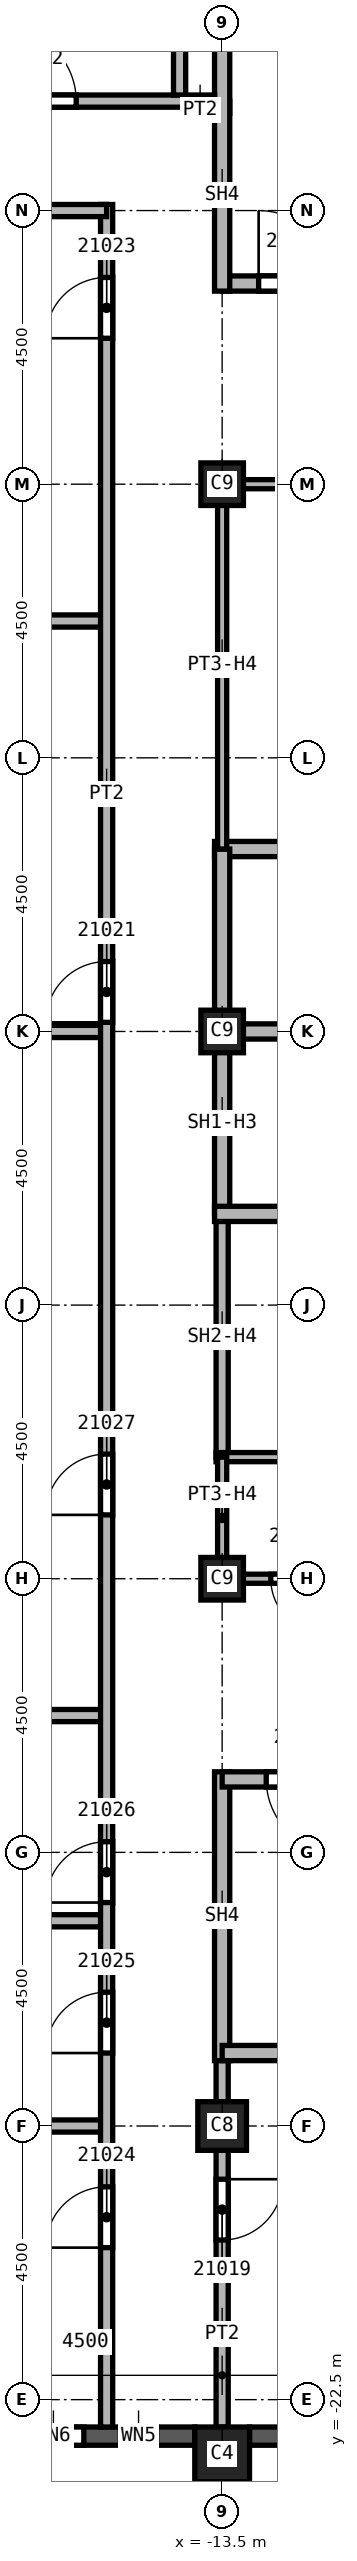
"""IFC4 building model, lengths in metres.
Left out: names, types, materials, properties, quantities, classifications, styles, units other than length and angle.
Written with IfcOpenShell. Run it as: python <this file> out.ifc"""

import sys

from ifc_helpers import new_model, si_unit, direction, frame, frame_2d, origin, origin_2d, place, context, subcontext, project, spatial, rectangle, extrude, element, fill, save


model = new_model("IFC4")
c1 = context("Model", 3, precision=1e-05, world=origin(), true_north=direction((0.0, 1.0)))
c2 = subcontext(c1, "Body", "Model", "MODEL_VIEW")
j1 = project(units=[si_unit("LENGTHUNIT", "METRE"), si_unit("PLANEANGLEUNIT", "RADIAN")], contexts=[c1])
p1 = place(None, origin())
s1 = spatial("IfcSite", under=j1, at=p1, CompositionType="ELEMENT")
p2 = place(p1, origin())
s2 = spatial("IfcBuilding", under=s1, at=p2, CompositionType="ELEMENT")
p3 = place(p2, frame((0.0, 0.0, 308.0)))
s3 = spatial("IfcBuildingStorey", under=s2, at=p3, CompositionType="ELEMENT", Elevation=308.0)
p4 = place(p3, frame((-13.5, -18.0, 0.0), z_axis=(0.0, 0.0, 1.0), x_axis=(1.0, 0.0, 0.0)))
e1 = element("IfcColumn", 1, at=p4, inside=s3, PredefinedType="COLUMN", context=c2, shape_type="SweptSolid", body=[
    extrude(rectangle(XDim=0.8, YDim=0.8, at=origin_2d()), origin(), (0.0, 0.0, 1.0), 3.74),
])
for number, where, z_axis, x_axis in (
    (2, (-13.5, 0.0, 0.0), (0.0, 0.0, 1.0), (1.0, 0.0, 0.0)),
    (3, (-13.5, 9.0, 0.0), (0.0, 0.0, 1.0), (1.0, 0.0, 0.0)),
    (4, (-13.5, -9.0, 0.0), (0.0, 0.0, 1.0), (1.0, 0.0, 0.0)),
):
    element("IfcColumn", number, at=place(p3, frame(where, z_axis=z_axis, x_axis=x_axis)), inside=s3, PredefinedType="COLUMN", context=c2, shape_type="SweptSolid", body=[
        extrude(rectangle(XDim=0.7, YDim=0.7, at=origin_2d()), origin(), (0.0, 0.0, 1.0), 3.74),
    ])
p5 = place(p3, frame((-13.5, -23.4, 0.0), z_axis=(0.0, 0.0, 1.0), x_axis=(1.0, 0.0, 0.0)))
e5 = element("IfcColumn", 5, at=p5, inside=s3, PredefinedType="COLUMN", context=c2, shape_type="SweptSolid", body=[
    extrude(rectangle(XDim=0.9, YDim=0.9, at=origin_2d()), origin(), (0.0, 0.0, 1.0), 3.74),
])
p6 = place(p3, frame((-17.55, -23.1, 0.0), z_axis=(0.0, 0.0, 1.0), x_axis=(1.0, 0.0, 0.0)))
e6 = element("IfcWall", 6, at=p6, inside=s3, PredefinedType="SOLIDWALL", context=c2, shape_type="SweptSolid", body=[
    extrude(rectangle(XDim=3.6, YDim=0.3, at=frame_2d((1.8, 0.0))), origin(), (0.0, 0.0, 1.0), 3.14),
])
p7 = place(p6, frame((0.775, 0.0, 0.8)))
e7 = element("IfcOpeningElement", 7, at=p7, cuts=e6, PredefinedType="OPENING", context=c2, shape_type="SweptSolid", body=[
    extrude(rectangle(XDim=1.0, YDim=1.95, at=frame_2d((0.5, 0.975))), frame((0.0, 0.15, 0.0), z_axis=(0.0, -1.0, 0.0), x_axis=(1.0, 0.0, 0.0)), (0.0, 0.0, 1.0), 0.3),
])
p8 = place(p6, frame((2.375, 0.0, 0.8)))
e8 = element("IfcOpeningElement", 8, at=p8, cuts=e6, PredefinedType="OPENING", context=c2, shape_type="SweptSolid", body=[
    extrude(rectangle(XDim=0.6, YDim=1.95, at=frame_2d((0.3, 0.975))), frame((0.0, 0.15, 0.0), z_axis=(0.0, -1.0, 0.0), x_axis=(1.0, 0.0, 0.0)), (0.0, 0.0, 1.0), 0.3),
])
p9 = place(p3, frame((-13.05, -23.1, 0.0), z_axis=(0.0, 0.0, 1.0), x_axis=(1.0, 0.0, 0.0)))
e9 = element("IfcWall", 9, at=p9, inside=s3, PredefinedType="SOLIDWALL", context=c2, shape_type="SweptSolid", body=[
    extrude(rectangle(XDim=3.6, YDim=0.3, at=frame_2d((1.8, 0.0))), origin(), (0.0, 0.0, 1.0), 3.14),
])
p10 = place(p9, frame((0.6, 0.0, 0.8)))
e10 = element("IfcOpeningElement", 10, at=p10, cuts=e9, PredefinedType="OPENING", context=c2, shape_type="SweptSolid", body=[
    extrude(rectangle(XDim=2.4, YDim=1.95, at=frame_2d((1.2, 0.975))), frame((0.0, 0.15, 0.0), z_axis=(0.0, -1.0, 0.0), x_axis=(1.0, 0.0, 0.0)), (0.0, 0.0, 1.0), 0.3),
])
for number, where, z_axis, x_axis in (
    (11, (-26.55, -14.625, 0.0), (0.0, 0.0, 1.0), (1.0, 0.0, 0.0)),
    (12, (-26.55, -11.25, 0.0), (0.0, 0.0, 1.0), (1.0, 0.0, 0.0)),
    (13, (-26.55, 6.75, 0.0), (0.0, 0.0, 1.0), (1.0, 0.0, 0.0)),
):
    element("IfcWall", number, at=place(p3, frame(where, z_axis=z_axis, x_axis=x_axis)), inside=s3, PredefinedType="PARTITIONING", context=c2, shape_type="SweptSolid", body=[
        extrude(rectangle(XDim=11.15, YDim=0.2, at=frame_2d((5.575, 0.0))), origin(), (0.0, 0.0, 1.0), 3.74),
    ])
p11 = place(p3, frame((-24.3, -18.0, 0.0), z_axis=(0.0, 0.0, 1.0), x_axis=(1.0, 0.0, 0.0)))
e14 = element("IfcWall", 14, at=p11, inside=s3, PredefinedType="PARTITIONING", context=c2, shape_type="SweptSolid", body=[
    extrude(rectangle(XDim=8.9, YDim=0.2, at=frame_2d((4.45, 0.0))), origin(), (0.0, 0.0, 1.0), 3.74),
])
p12 = place(p3, frame((-15.4, 0.0, 0.0), z_axis=(0.0, 0.0, 1.0), x_axis=(-1.0, 0.0, 0.0)))
e15 = element("IfcWall", 15, at=p12, inside=s3, PredefinedType="PARTITIONING", context=c2, shape_type="SweptSolid", body=[
    extrude(rectangle(XDim=11.15, YDim=0.2, at=frame_2d((5.575, 0.0))), origin(), (0.0, 0.0, 1.0), 3.74),
])
p13 = place(p3, frame((-15.4, -22.95, 0.0), z_axis=(0.0, 0.0, 1.0), x_axis=(0.0, 1.0, 0.0)))
e16 = element("IfcWall", 16, at=p13, inside=s3, PredefinedType="PARTITIONING", context=c2, shape_type="SweptSolid", body=[
    extrude(rectangle(XDim=36.55, YDim=0.2, at=frame_2d((18.275, 0.0))), origin(), (0.0, 0.0, 1.0), 3.74),
])
p14 = place(p13, frame((23.1, 0.0, 0.0)))
e17 = element("IfcOpeningElement", 17, at=p14, cuts=e16, PredefinedType="OPENING", context=c2, shape_type="SweptSolid", body=[
    extrude(rectangle(XDim=1.0, YDim=2.1, at=frame_2d((0.5, 1.05))), frame((0.0, 0.1, 0.0), z_axis=(0.0, -1.0, 0.0), x_axis=(1.0, 0.0, 0.0)), (0.0, 0.0, 1.0), 0.2),
])
p15 = place(p13, frame((34.35, 0.0, 0.0)))
e18 = element("IfcOpeningElement", 18, at=p15, cuts=e16, PredefinedType="OPENING", context=c2, shape_type="SweptSolid", body=[
    extrude(rectangle(XDim=1.0, YDim=2.1, at=frame_2d((0.5, 1.05))), frame((0.0, 0.1, 0.0), z_axis=(0.0, -1.0, 0.0), x_axis=(1.0, 0.0, 0.0)), (0.0, 0.0, 1.0), 0.2),
])
p16 = place(p13, frame((2.95, 0.0, 0.0)))
e19 = element("IfcOpeningElement", 19, at=p16, cuts=e16, PredefinedType="OPENING", context=c2, shape_type="SweptSolid", body=[
    extrude(rectangle(XDim=1.0, YDim=2.1, at=frame_2d((0.5, 1.05))), frame((0.0, 0.1, 0.0), z_axis=(0.0, -1.0, 0.0), x_axis=(1.0, 0.0, 0.0)), (0.0, 0.0, 1.0), 0.2),
])
p17 = place(p13, frame((6.15, 0.0, 0.0)))
e20 = element("IfcOpeningElement", 20, at=p17, cuts=e16, PredefinedType="OPENING", context=c2, shape_type="SweptSolid", body=[
    extrude(rectangle(XDim=1.0, YDim=2.1, at=frame_2d((0.5, 1.05))), frame((0.0, 0.1, 0.0), z_axis=(0.0, -1.0, 0.0), x_axis=(1.0, 0.0, 0.0)), (0.0, 0.0, 1.0), 0.2),
])
p18 = place(p13, frame((8.625, 0.0, 0.0)))
e21 = element("IfcOpeningElement", 21, at=p18, cuts=e16, PredefinedType="OPENING", context=c2, shape_type="SweptSolid", body=[
    extrude(rectangle(XDim=1.0, YDim=2.1, at=frame_2d((0.5, 1.05))), frame((0.0, 0.1, 0.0), z_axis=(0.0, -1.0, 0.0), x_axis=(1.0, 0.0, 0.0)), (0.0, 0.0, 1.0), 0.2),
])
p19 = place(p13, frame((15.0, 0.0, 0.0)))
e22 = element("IfcOpeningElement", 22, at=p19, cuts=e16, PredefinedType="OPENING", context=c2, shape_type="SweptSolid", body=[
    extrude(rectangle(XDim=1.0, YDim=2.1, at=frame_2d((0.5, 1.05))), frame((0.0, 0.1, 0.0), z_axis=(0.0, -1.0, 0.0), x_axis=(1.0, 0.0, 0.0)), (0.0, 0.0, 1.0), 0.2),
])
p20 = place(p3, frame((-15.4, 13.5, 0.0), z_axis=(0.0, 0.0, 1.0), x_axis=(-1.0, 0.0, 0.0)))
e23 = element("IfcWall", 23, at=p20, inside=s3, PredefinedType="PARTITIONING", context=c2, shape_type="SweptSolid", body=[
    extrude(rectangle(XDim=6.6, YDim=0.2, at=frame_2d((3.3, 0.0))), origin(), (0.0, 0.0, 1.0), 3.74),
])
p21 = place(p3, frame((-14.1, 15.2, 0.0), z_axis=(0.0, 0.0, 1.0), x_axis=(1.0, 0.0, 0.0)))
e24 = element("IfcWall", 24, at=p21, inside=s3, PredefinedType="PARTITIONING", context=c2, shape_type="SweptSolid", body=[
    extrude(rectangle(XDim=0.725, YDim=0.2, at=frame_2d((0.363, 0.0))), origin(), (0.0, 0.0, 1.0), 3.74),
])
p22 = place(p3, frame((-13.5, -16.675, 0.0), z_axis=(0.0, 0.0, 1.0), x_axis=(0.0, -1.0, 0.0)))
e25 = element("IfcWall", 25, at=p22, inside=s3, PredefinedType="PARTITIONING", context=c2, shape_type="SweptSolid", body=[
    extrude(rectangle(XDim=6.275, YDim=0.2, at=frame_2d((3.137, 0.0))), origin(), (0.0, 0.0, 1.0), 3.74),
])
p23 = place(p22, frame((2.2, 0.0, 0.0)))
e26 = element("IfcOpeningElement", 26, at=p23, cuts=e25, PredefinedType="OPENING", context=c2, shape_type="SweptSolid", body=[
    extrude(rectangle(XDim=1.0, YDim=2.1, at=frame_2d((0.5, 1.05))), frame((0.0, 0.1, 0.0), z_axis=(0.0, -1.0, 0.0), x_axis=(1.0, 0.0, 0.0)), (0.0, 0.0, 1.0), 0.2),
])
p24 = place(p3, frame((-13.5, -7.0, 0.0), z_axis=(0.0, 0.0, 1.0), x_axis=(0.0, 1.0, 0.0)))
e27 = element("IfcWall", 27, at=p24, inside=s3, PredefinedType="SOLIDWALL", context=c2, shape_type="SweptSolid", body=[
    extrude(rectangle(XDim=4.0, YDim=0.2, at=frame_2d((2.0, 0.0))), origin(), (0.0, 0.0, 1.0), 3.062),
])
p25 = place(p3, frame((-13.625, 0.0, 0.0), z_axis=(0.0, 0.0, 1.0), x_axis=(1.0, 0.0, 0.0)))
e28 = element("IfcWall", 28, at=p25, inside=s3, PredefinedType="SOLIDWALL", context=c2, shape_type="SweptSolid", body=[
    extrude(rectangle(XDim=3.125, YDim=0.25, at=frame_2d((1.562, 0.0))), origin(), (0.0, 0.0, 1.0), 3.74),
])
p26 = place(p3, frame((-13.625, 3.0, 0.0), z_axis=(0.0, 0.0, 1.0), x_axis=(1.0, 0.0, 0.0)))
e29 = element("IfcWall", 29, at=p26, inside=s3, PredefinedType="SOLIDWALL", context=c2, shape_type="SweptSolid", body=[
    extrude(rectangle(XDim=6.125, YDim=0.25, at=frame_2d((3.062, 0.0))), origin(), (0.0, 0.0, 1.0), 3.74),
])
p27 = place(p26, frame((4.0, 0.0, 0.0)))
e30 = element("IfcOpeningElement", 30, at=p27, cuts=e29, PredefinedType="OPENING", context=c2, shape_type="SweptSolid", body=[
    extrude(rectangle(XDim=1.1, YDim=2.1, at=frame_2d((0.55, 1.05))), frame((0.0, 0.125, 0.0), z_axis=(0.0, -1.0, 0.0), x_axis=(1.0, 0.0, 0.0)), (0.0, 0.0, 1.0), 0.25),
])
p28 = place(p3, frame((-13.5, -3.0, 0.0), z_axis=(0.0, 0.0, 1.0), x_axis=(0.0, 1.0, 0.0)))
e31 = element("IfcWall", 31, at=p28, inside=s3, PredefinedType="SOLIDWALL", context=c2, shape_type="SweptSolid", body=[
    extrude(rectangle(XDim=6.0, YDim=0.25, at=frame_2d((3.0, 0.0))), origin(), (0.0, 0.0, 1.0), 3.062),
])
p29 = place(p3, frame((-13.625, -3.0, 0.0), z_axis=(0.0, 0.0, 1.0), x_axis=(1.0, 0.0, 0.0)))
e32 = element("IfcWall", 32, at=p29, inside=s3, PredefinedType="SOLIDWALL", context=c2, shape_type="SweptSolid", body=[
    extrude(rectangle(XDim=6.125, YDim=0.25, at=frame_2d((3.062, 0.0))), origin(), (0.0, 0.0, 1.0), 3.74),
])
p30 = place(p29, frame((4.0, 0.0, 0.0)))
e33 = element("IfcOpeningElement", 33, at=p30, cuts=e32, PredefinedType="OPENING", context=c2, shape_type="SweptSolid", body=[
    extrude(rectangle(XDim=1.1, YDim=2.1, at=frame_2d((0.55, 1.05))), frame((0.0, 0.125, 0.0), z_axis=(0.0, -1.0, 0.0), x_axis=(1.0, 0.0, 0.0)), (0.0, 0.0, 1.0), 0.25),
])
p31 = place(p3, frame((-13.5, -12.175, 0.0), z_axis=(0.0, 0.0, 1.0), x_axis=(0.0, -1.0, 0.0)))
e34 = element("IfcWall", 34, at=p31, inside=s3, PredefinedType="SOLIDWALL", context=c2, shape_type="SweptSolid", body=[
    extrude(rectangle(XDim=4.75, YDim=0.25, at=frame_2d((2.375, 0.0))), origin(), (0.0, 0.0, 1.0), 3.74),
])
p32 = place(p3, frame((-13.5, 12.3, 0.0), z_axis=(0.0, 0.0, 1.0), x_axis=(1.0, 0.0, 0.0)))
e35 = element("IfcWall", 35, at=p32, inside=s3, PredefinedType="SOLIDWALL", context=c2, shape_type="SweptSolid", body=[
    extrude(rectangle(XDim=9.125, YDim=0.25, at=frame_2d((4.562, 0.0))), origin(), (0.0, 0.0, 1.0), 3.74),
])
p33 = place(p32, frame((0.6, 0.0, 0.0)))
e36 = element("IfcOpeningElement", 36, at=p33, cuts=e35, PredefinedType="OPENING", context=c2, shape_type="SweptSolid", body=[
    extrude(rectangle(XDim=1.2, YDim=2.1, at=frame_2d((0.6, 1.05))), frame((0.0, 0.125, 0.0), z_axis=(0.0, -1.0, 0.0), x_axis=(1.0, 0.0, 0.0)), (0.0, 0.0, 1.0), 0.25),
])
p34 = place(p3, frame((-13.5, 12.175, 0.0), z_axis=(0.0, 0.0, 1.0), x_axis=(0.0, 1.0, 0.0)))
e37 = element("IfcWall", 37, at=p34, inside=s3, PredefinedType="SOLIDWALL", context=c2, shape_type="SweptSolid", body=[
    extrude(rectangle(XDim=4.75, YDim=0.25, at=frame_2d((2.375, 0.0))), origin(), (0.0, 0.0, 1.0), 3.74),
])
p35 = place(p3, frame((-4.5, -16.8, 0.0), z_axis=(0.0, 0.0, 1.0), x_axis=(-1.0, 0.0, 0.0)))
e38 = element("IfcWall", 38, at=p35, inside=s3, PredefinedType="SOLIDWALL", context=c2, shape_type="SweptSolid", body=[
    extrude(rectangle(XDim=9.0, YDim=0.25, at=frame_2d((4.5, 0.0))), origin(), (0.0, 0.0, 1.0), 3.74),
])
p36 = place(p3, frame((-4.375, -12.3, 0.0), z_axis=(0.0, 0.0, 1.0), x_axis=(-1.0, 0.0, 0.0)))
e39 = element("IfcWall", 39, at=p36, inside=s3, PredefinedType="SOLIDWALL", context=c2, shape_type="SweptSolid", body=[
    extrude(rectangle(XDim=9.125, YDim=0.25, at=frame_2d((4.562, 0.0))), origin(), (0.0, 0.0, 1.0), 3.74),
])
p37 = place(p36, frame((7.2, 0.0, 0.0)))
e40 = element("IfcOpeningElement", 40, at=p37, cuts=e39, PredefinedType="OPENING", context=c2, shape_type="SweptSolid", body=[
    extrude(rectangle(XDim=1.2, YDim=2.1, at=frame_2d((0.6, 1.05))), frame((0.0, 0.125, 0.0), z_axis=(0.0, -1.0, 0.0), x_axis=(1.0, 0.0, 0.0)), (0.0, 0.0, 1.0), 0.25),
])
p38 = place(p3, frame((-13.6, -7.0, 0.0), z_axis=(0.0, 0.0, 1.0), x_axis=(1.0, 0.0, 0.0)))
e41 = element("IfcWall", 41, at=p38, inside=s3, PredefinedType="PARTITIONING", context=c2, shape_type="SweptSolid", body=[
    extrude(rectangle(XDim=3.1, YDim=0.15, at=frame_2d((1.55, 0.0))), origin(), (0.0, 0.0, 1.0), 3.74),
])
p39 = place(p3, frame((-13.5, -9.075, 0.0), z_axis=(0.0, 0.0, 1.0), x_axis=(0.0, 1.0, 0.0)))
e42 = element("IfcWall", 42, at=p39, inside=s3, PredefinedType="PARTITIONING", context=c2, shape_type="SweptSolid", body=[
    extrude(rectangle(XDim=2.075, YDim=0.15, at=frame_2d((1.038, 0.0))), origin(), (0.0, 0.0, 1.0), 3.062),
])
p40 = place(p3, frame((-13.5, 3.0, 0.0), z_axis=(0.0, 0.0, 1.0), x_axis=(0.0, 1.0, 0.0)))
e43 = element("IfcWall", 43, at=p40, inside=s3, PredefinedType="PARTITIONING", context=c2, shape_type="SweptSolid", body=[
    extrude(rectangle(XDim=6.075, YDim=0.15, at=frame_2d((3.038, 0.0))), origin(), (0.0, 0.0, 1.0), 3.062),
])
p41 = place(p3, frame((-13.5, 9.0, 0.0), z_axis=(0.0, 0.0, 1.0), x_axis=(1.0, 0.0, 0.0)))
e44 = element("IfcWall", 44, at=p41, inside=s3, PredefinedType="PARTITIONING", context=c2, shape_type="SweptSolid", body=[
    extrude(rectangle(XDim=3.0, YDim=0.15, at=frame_2d((1.5, 0.0))), origin(), (0.0, 0.0, 1.0), 3.062),
])
p42 = place(p3, frame((-10.5, -9.0, 0.0), z_axis=(0.0, 0.0, 1.0), x_axis=(-1.0, 0.0, 0.0)))
e45 = element("IfcWall", 45, at=p42, inside=s3, PredefinedType="PARTITIONING", context=c2, shape_type="SweptSolid", body=[
    extrude(rectangle(XDim=3.0, YDim=0.15, at=frame_2d((1.5, 0.0))), origin(), (0.0, 0.0, 1.0), 3.062),
])
p43 = place(p42, frame((1.3, 0.0, 0.0)))
e46 = element("IfcOpeningElement", 46, at=p43, cuts=e45, PredefinedType="OPENING", context=c2, shape_type="SweptSolid", body=[
    extrude(rectangle(XDim=0.9, YDim=2.1, at=frame_2d((0.45, 1.05))), frame((0.0, 0.075, 0.0), z_axis=(0.0, -1.0, 0.0), x_axis=(1.0, 0.0, 0.0)), (0.0, 0.0, 1.0), 0.15),
])
p44 = place(p3, frame((-21.9, 15.3, 0.0), z_axis=(0.0, 0.0, 1.0), x_axis=(1.0, 0.0, 0.0)))
e47 = element("IfcWall", 47, at=p44, inside=s3, PredefinedType="SOLIDWALL", context=c2, shape_type="SweptSolid", body=[
    extrude(rectangle(XDim=8.275, YDim=0.2, at=frame_2d((4.137, 0.0))), origin(), (0.0, 0.0, 1.0), 3.74),
])
p45 = place(p44, frame((4.8, 0.0, 0.0)))
e48 = element("IfcOpeningElement", 48, at=p45, cuts=e47, PredefinedType="OPENING", context=c2, shape_type="SweptSolid", body=[
    extrude(rectangle(XDim=1.2, YDim=2.1, at=frame_2d((0.6, 1.05))), frame((0.0, 0.1, 0.0), z_axis=(0.0, -1.0, 0.0), x_axis=(1.0, 0.0, 0.0)), (0.0, 0.0, 1.0), 0.2),
])
p46 = place(p3, frame((-14.2, 15.4, 0.0), z_axis=(0.0, 0.0, 1.0), x_axis=(0.0, 1.0, 0.0)))
e49 = element("IfcWall", 49, at=p46, inside=s3, PredefinedType="SOLIDWALL", context=c2, shape_type="SweptSolid", body=[
    extrude(rectangle(XDim=5.9, YDim=0.2, at=frame_2d((2.95, 0.0))), origin(), (0.0, 0.0, 1.0), 3.74),
])
p47 = place(p43, origin())
e50 = element("IfcDoor", 50, at=p47, inside=s3, OperationType="SINGLE_SWING_RIGHT", PredefinedType="DOOR", context=c2, shape_type="SweptSolid", body=[
    extrude(rectangle(XDim=0.9, YDim=2.1, at=frame_2d((0.45, 1.05))), frame((0.0, 0.025, 0.0), z_axis=(0.0, -1.0, 0.0), x_axis=(1.0, 0.0, 0.0)), (0.0, 0.0, 1.0), 0.05),
])
fill(e46, e50)
p48 = place(p33, origin())
e51 = element("IfcDoor", 51, at=p48, inside=s3, OperationType="SINGLE_SWING_LEFT", PredefinedType="DOOR", context=c2, shape_type="SweptSolid", body=[
    extrude(rectangle(XDim=1.2, YDim=2.1, at=frame_2d((0.6, 1.05))), frame((0.0, 0.025, 0.0), z_axis=(0.0, -1.0, 0.0), x_axis=(1.0, 0.0, 0.0)), (0.0, 0.0, 1.0), 0.05),
])
fill(e36, e51)
p49 = place(p37, origin())
e52 = element("IfcDoor", 52, at=p49, inside=s3, OperationType="SINGLE_SWING_RIGHT", PredefinedType="DOOR", context=c2, shape_type="SweptSolid", body=[
    extrude(rectangle(XDim=1.2, YDim=2.1, at=frame_2d((0.6, 1.05))), frame((0.0, 0.025, 0.0), z_axis=(0.0, -1.0, 0.0), x_axis=(1.0, 0.0, 0.0)), (0.0, 0.0, 1.0), 0.05),
])
fill(e40, e52)
p50 = place(p23, origin())
e53 = element("IfcDoor", 53, at=p50, inside=s3, OperationType="SINGLE_SWING_RIGHT", PredefinedType="DOOR", context=c2, shape_type="SweptSolid", body=[
    extrude(rectangle(XDim=1.0, YDim=2.1, at=frame_2d((0.5, 1.05))), frame((0.0, 0.025, 0.0), z_axis=(0.0, -1.0, 0.0), x_axis=(1.0, 0.0, 0.0)), (0.0, 0.0, 1.0), 0.05),
])
fill(e26, e53)
p51 = place(p14, origin())
e54 = element("IfcDoor", 54, at=p51, inside=s3, OperationType="SINGLE_SWING_RIGHT", PredefinedType="DOOR", context=c2, shape_type="SweptSolid", body=[
    extrude(rectangle(XDim=1.0, YDim=2.1, at=frame_2d((0.5, 1.05))), frame((0.0, 0.025, 0.0), z_axis=(0.0, -1.0, 0.0), x_axis=(1.0, 0.0, 0.0)), (0.0, 0.0, 1.0), 0.05),
])
fill(e17, e54)
p52 = place(p15, origin())
e55 = element("IfcDoor", 55, at=p52, inside=s3, OperationType="SINGLE_SWING_RIGHT", PredefinedType="DOOR", context=c2, shape_type="SweptSolid", body=[
    extrude(rectangle(XDim=1.0, YDim=2.1, at=frame_2d((0.5, 1.05))), frame((0.0, 0.025, 0.0), z_axis=(0.0, -1.0, 0.0), x_axis=(1.0, 0.0, 0.0)), (0.0, 0.0, 1.0), 0.05),
])
fill(e18, e55)
p53 = place(p16, origin())
e56 = element("IfcDoor", 56, at=p53, inside=s3, OperationType="SINGLE_SWING_LEFT", PredefinedType="DOOR", context=c2, shape_type="SweptSolid", body=[
    extrude(rectangle(XDim=1.0, YDim=2.1, at=frame_2d((0.5, 1.05))), frame((0.0, 0.025, 0.0), z_axis=(0.0, -1.0, 0.0), x_axis=(1.0, 0.0, 0.0)), (0.0, 0.0, 1.0), 0.05),
])
fill(e19, e56)
p54 = place(p17, origin())
e57 = element("IfcDoor", 57, at=p54, inside=s3, OperationType="SINGLE_SWING_RIGHT", PredefinedType="DOOR", context=c2, shape_type="SweptSolid", body=[
    extrude(rectangle(XDim=1.0, YDim=2.1, at=frame_2d((0.5, 1.05))), frame((0.0, 0.025, 0.0), z_axis=(0.0, -1.0, 0.0), x_axis=(1.0, 0.0, 0.0)), (0.0, 0.0, 1.0), 0.05),
])
fill(e20, e57)
p55 = place(p18, origin())
e58 = element("IfcDoor", 58, at=p55, inside=s3, OperationType="SINGLE_SWING_LEFT", PredefinedType="DOOR", context=c2, shape_type="SweptSolid", body=[
    extrude(rectangle(XDim=1.0, YDim=2.1, at=frame_2d((0.5, 1.05))), frame((0.0, 0.025, 0.0), z_axis=(0.0, -1.0, 0.0), x_axis=(1.0, 0.0, 0.0)), (0.0, 0.0, 1.0), 0.05),
])
fill(e21, e58)
p56 = place(p19, origin())
e59 = element("IfcDoor", 59, at=p56, inside=s3, OperationType="SINGLE_SWING_RIGHT", PredefinedType="DOOR", context=c2, shape_type="SweptSolid", body=[
    extrude(rectangle(XDim=1.0, YDim=2.1, at=frame_2d((0.5, 1.05))), frame((0.0, 0.025, 0.0), z_axis=(0.0, -1.0, 0.0), x_axis=(1.0, 0.0, 0.0)), (0.0, 0.0, 1.0), 0.05),
])
fill(e22, e59)
p57 = place(p45, origin())
e60 = element("IfcDoor", 60, at=p57, inside=s3, OperationType="SINGLE_SWING_RIGHT", PredefinedType="DOOR", context=c2, shape_type="SweptSolid", body=[
    extrude(rectangle(XDim=1.2, YDim=2.1, at=frame_2d((0.6, 1.05))), frame((0.0, 0.025, 0.0), z_axis=(0.0, -1.0, 0.0), x_axis=(1.0, 0.0, 0.0)), (0.0, 0.0, 1.0), 0.05),
])
fill(e48, e60)
p58 = place(p7, origin())
e61 = element("IfcWindow", 61, at=p58, inside=s3, PartitioningType="SINGLE_PANEL", PredefinedType="WINDOW", context=c2, shape_type="SweptSolid", body=[
    extrude(rectangle(XDim=1.0, YDim=1.95, at=frame_2d((0.5, 0.975))), frame((0.0, 0.03, 0.0), z_axis=(0.0, -1.0, 0.0), x_axis=(1.0, 0.0, 0.0)), (0.0, 0.0, 1.0), 0.06),
])
fill(e7, e61)
p59 = place(p8, origin())
e62 = element("IfcWindow", 62, at=p59, inside=s3, PartitioningType="SINGLE_PANEL", PredefinedType="WINDOW", context=c2, shape_type="SweptSolid", body=[
    extrude(rectangle(XDim=0.6, YDim=1.95, at=frame_2d((0.3, 0.975))), frame((0.0, 0.03, 0.0), z_axis=(0.0, -1.0, 0.0), x_axis=(1.0, 0.0, 0.0)), (0.0, 0.0, 1.0), 0.06),
])
fill(e8, e62)
save(model, sys.argv[1])
